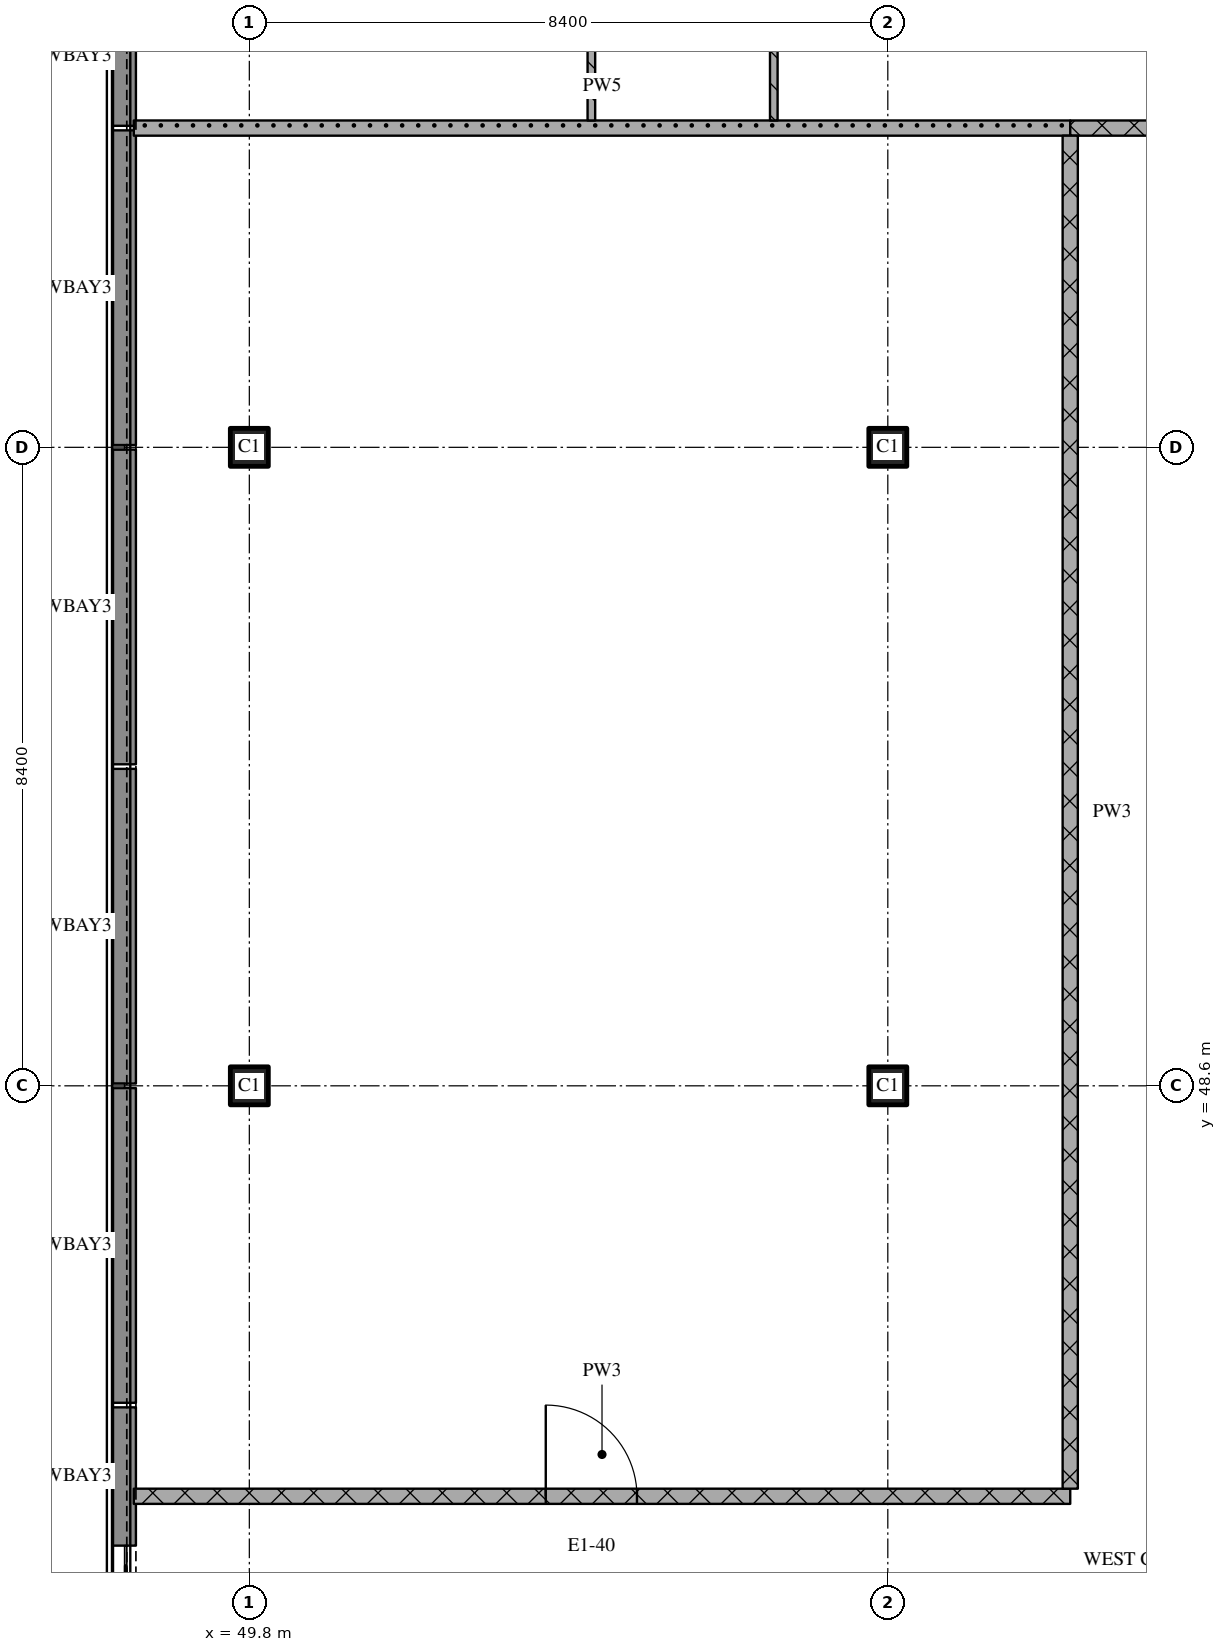
"""IFC4 building model, lengths in metres.
Left out: names, types, materials, properties, quantities, classifications, styles, units other than length and angle.
Written with IfcOpenShell. Run it as: python <this file> out.ifc"""

import sys

from ifc_helpers import new_model, si_unit, direction, frame, frame_2d, origin, origin_2d, place, context, subcontext, project, spatial, rectangle, extrude, element, fill, save


model = new_model("IFC4")
c1 = context("Model", 3, precision=1e-05, world=origin(), true_north=direction((0.0, 1.0)))
c2 = subcontext(c1, "Body", "Model", "MODEL_VIEW")
j1 = project(units=[si_unit("LENGTHUNIT", "METRE"), si_unit("PLANEANGLEUNIT", "RADIAN")], contexts=[c1])
p1 = place(None, origin())
s1 = spatial("IfcSite", under=j1, at=p1, CompositionType="ELEMENT")
p2 = place(p1, origin())
s2 = spatial("IfcBuilding", under=s1, at=p2, CompositionType="ELEMENT")
p3 = place(p2, frame((0.0, 0.0, 263.55)))
s3 = spatial("IfcBuildingStorey", under=s2, at=p3, CompositionType="ELEMENT", Elevation=263.55)
for number, where, z_axis, x_axis in (
    (1, (49.8, 48.6, 0.0), (0.0, 0.0, 1.0), (1.0, 0.0, 0.0)),
    (2, (49.8, 57.0, 0.0), (0.0, 0.0, 1.0), (1.0, 0.0, 0.0)),
    (3, (58.2, 48.6, 0.0), (0.0, 0.0, 1.0), (1.0, 0.0, 0.0)),
    (4, (58.2, 57.0, 0.0), (0.0, 0.0, 1.0), (1.0, 0.0, 0.0)),
):
    element("IfcColumn", number, at=place(p3, frame(where, z_axis=z_axis, x_axis=x_axis)), inside=s3, PredefinedType="COLUMN", context=c2, shape_type="SweptSolid", body=[
        extrude(rectangle(XDim=0.5, YDim=0.5, at=origin_2d()), origin(), (0.0, 0.0, 1.0), 3.6),
    ])
p4 = place(p3, frame((48.154, 61.23, 0.0), z_axis=(0.0, 0.0, 1.0), x_axis=(0.0, 1.0, 0.0)))
e5 = element("IfcWall", 5, at=p4, inside=s3, PredefinedType="SOLIDWALL", context=c2, shape_type="SweptSolid", body=[
    extrude(rectangle(XDim=1.819, YDim=0.308, at=frame_2d((0.91, 0.0))), origin(), (0.0, 0.0, 1.0), 3.2),
])
for number, where, z_axis, x_axis in (
    (6, (48.154, 57.03, 0.0), (0.0, 0.0, 1.0), (0.0, 1.0, 0.0)),
    (7, (48.154, 52.83, 0.0), (0.0, 0.0, 1.0), (0.0, 1.0, 0.0)),
):
    element("IfcWall", number, at=place(p3, frame(where, z_axis=z_axis, x_axis=x_axis)), inside=s3, PredefinedType="SOLIDWALL", context=c2, shape_type="SweptSolid", body=[
        extrude(rectangle(XDim=4.14, YDim=0.308, at=frame_2d((2.07, 0.0))), origin(), (0.0, 0.0, 1.0), 3.2),
    ])
for number, where, z_axis, x_axis in (
    (8, (48.154, 48.63, 0.0), (0.0, 0.0, 1.0), (0.0, 1.0, 0.0)),
    (9, (48.154, 44.43, 0.0), (0.0, 0.0, 1.0), (0.0, 1.0, 0.0)),
):
    element("IfcWall", number, at=place(p3, frame(where, z_axis=z_axis, x_axis=x_axis)), inside=s3, PredefinedType="SOLIDWALL", context=c2, shape_type="SweptSolid", body=[
        extrude(rectangle(XDim=4.14, YDim=0.308, at=frame_2d((2.07, 0.0))), origin(), (0.0, 0.0, 1.0), 3.2),
    ])
p5 = place(p3, frame((48.154, 42.551, 0.0), z_axis=(0.0, 0.0, 1.0), x_axis=(0.0, 1.0, 0.0)))
e10 = element("IfcWall", 10, at=p5, inside=s3, PredefinedType="SOLIDWALL", context=c2, shape_type="SweptSolid", body=[
    extrude(rectangle(XDim=1.819, YDim=0.308, at=frame_2d((0.91, 0.0))), origin(), (0.0, 0.0, 1.0), 3.2),
])
p6 = place(p3, frame((48.28, 43.2, 0.0), z_axis=(0.0, 0.0, 1.0), x_axis=(1.0, 0.0, 0.0)))
e11 = element("IfcWall", 11, at=p6, inside=s3, PredefinedType="PARTITIONING", context=c2, shape_type="SweptSolid", body=[
    extrude(rectangle(XDim=12.32, YDim=0.2, at=frame_2d((6.16, 0.0))), origin(), (0.0, 0.0, 1.0), 3.32),
])
p7 = place(p6, frame((5.42, 0.0, 0.0)))
e12 = element("IfcOpeningElement", 12, at=p7, cuts=e11, PredefinedType="OPENING", context=c2, shape_type="SweptSolid", body=[
    extrude(rectangle(XDim=1.2, YDim=2.1, at=frame_2d((0.6, 1.05))), frame((0.0, 0.11, 0.0), z_axis=(0.0, -1.0, 0.0), x_axis=(1.0, 0.0, 0.0)), (0.0, 0.0, 1.0), 0.22),
])
p8 = place(p3, frame((60.6, 61.2, 0.0), z_axis=(0.0, 0.0, 1.0), x_axis=(1.0, 0.0, 0.0)))
e13 = element("IfcWall", 13, at=p8, inside=s3, PredefinedType="PARTITIONING", context=c2, shape_type="SweptSolid", body=[
    extrude(rectangle(XDim=3.6, YDim=0.2, at=frame_2d((1.8, 0.0))), origin(), (0.0, 0.0, 1.0), 3.32),
])
p9 = place(p3, frame((48.28, 61.2, 0.0), z_axis=(0.0, 0.0, 1.0), x_axis=(1.0, 0.0, 0.0)))
e14 = element("IfcWall", 14, at=p9, inside=s3, PredefinedType="PARTITIONING", context=c2, shape_type="SweptSolid", body=[
    extrude(rectangle(XDim=12.32, YDim=0.2, at=frame_2d((6.16, 0.0))), origin(), (0.0, 0.0, 1.0), 3.32),
])
p10 = place(p3, frame((54.3, 65.35, 0.0), z_axis=(0.0, 0.0, 1.0), x_axis=(0.0, -1.0, 0.0)))
e15 = element("IfcWall", 15, at=p10, inside=s3, PredefinedType="PARTITIONING", context=c2, shape_type="SweptSolid", body=[
    extrude(rectangle(XDim=4.05, YDim=0.1, at=frame_2d((2.025, 0.0))), origin(), (0.0, 0.0, 1.0), 3.32),
])
p11 = place(p3, frame((56.7, 66.55, 0.0), z_axis=(0.0, 0.0, 1.0), x_axis=(0.0, -1.0, 0.0)))
e16 = element("IfcWall", 16, at=p11, inside=s3, PredefinedType="PARTITIONING", context=c2, shape_type="SweptSolid", body=[
    extrude(rectangle(XDim=5.25, YDim=0.1, at=frame_2d((2.625, 0.0))), origin(), (0.0, 0.0, 1.0), 3.32),
])
p12 = place(p11, frame((3.3, 0.0, 0.0)))
e17 = element("IfcOpeningElement", 17, at=p12, cuts=e16, PredefinedType="OPENING", context=c2, shape_type="SweptSolid", body=[
    extrude(rectangle(XDim=0.8, YDim=2.1, at=frame_2d((0.4, 1.05))), frame((0.0, 0.06, 0.0), z_axis=(0.0, -1.0, 0.0), x_axis=(1.0, 0.0, 0.0)), (0.0, 0.0, 1.0), 0.12),
])
p13 = place(p3, frame((60.6, 61.1, 0.0), z_axis=(0.0, 0.0, 1.0), x_axis=(0.0, -1.0, 0.0)))
e18 = element("IfcWall", 18, at=p13, inside=s3, PredefinedType="PARTITIONING", context=c2, shape_type="SweptSolid", body=[
    extrude(rectangle(XDim=17.8, YDim=0.2, at=frame_2d((8.9, 0.0))), origin(), (0.0, 0.0, 1.0), 3.32),
])
p14 = place(p7, origin())
e19 = element("IfcDoor", 19, at=p14, inside=s3, OperationType="SINGLE_SWING_LEFT", PredefinedType="DOOR", context=c2, shape_type="SweptSolid", body=[
    extrude(rectangle(XDim=1.2, YDim=2.1, at=frame_2d((0.6, 1.05))), frame((0.0, 0.025, 0.0), z_axis=(0.0, -1.0, 0.0), x_axis=(1.0, 0.0, 0.0)), (0.0, 0.0, 1.0), 0.05),
])
fill(e12, e19)
save(model, sys.argv[1])
